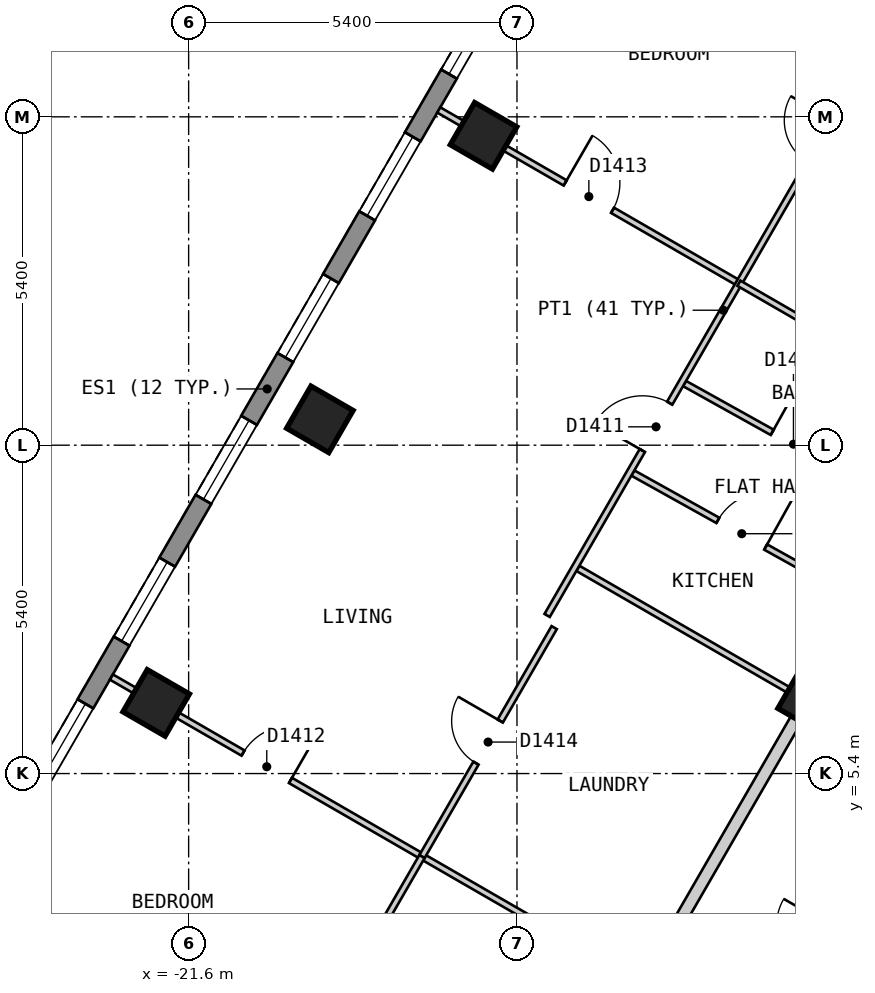
"""IFC4 building model, lengths in metres.
Left out: names, types, materials, properties, quantities, classifications, styles, units other than length and angle.
Written with IfcOpenShell. Run it as: python <this file> out.ifc"""

import sys

from ifc_helpers import new_model, si_unit, direction, frame, frame_2d, origin, origin_2d, place, context, subcontext, project, spatial, polyline, rectangle, outline, extrude, element, fill, save


model = new_model("IFC4")
c1 = context("Model", 3, precision=1e-05, world=origin(), true_north=direction((0.0, 1.0)))
c2 = subcontext(c1, "Body", "Model", "MODEL_VIEW")
j1 = project(units=[si_unit("LENGTHUNIT", "METRE"), si_unit("PLANEANGLEUNIT", "RADIAN")], contexts=[c1])
p1 = place(None, origin())
s1 = spatial("IfcSite", under=j1, at=p1, CompositionType="ELEMENT")
p2 = place(p1, origin())
s2 = spatial("IfcBuilding", under=s1, at=p2, CompositionType="ELEMENT")
p3 = place(p2, frame((0.0, 0.0, 166.2)))
s3 = spatial("IfcBuildingStorey", under=s2, at=p3, CompositionType="ELEMENT", Elevation=166.2)
for number, where, z_axis, x_axis in (
    (1, (-16.75, 15.888, 0.0), (0.0, 0.0, 1.0), (-0.5, -0.866, 0.0)),
    (2, (-19.442, 11.225, 0.0), (0.0, 0.0, 1.0), (-0.5, -0.866, 0.0)),
    (3, (-22.134, 6.562, 0.0), (0.0, 0.0, 1.0), (-0.5, -0.866, 0.0)),
):
    element("IfcColumn", number, at=place(p3, frame(where, z_axis=z_axis, x_axis=x_axis)), inside=s3, PredefinedType="COLUMN", context=c2, shape_type="SweptSolid", body=[
        extrude(rectangle(XDim=0.8, YDim=0.8, at=origin_2d()), origin(), (0.0, 0.0, 1.0), 3.0),
    ])
p4 = place(p3, frame((-11.431, 6.6, 0.0), z_axis=(0.0, 0.0, 1.0), x_axis=(-0.5, -0.866025403784, 0.0)))
e4 = element("IfcColumn", 4, at=p4, inside=s3, PredefinedType="COLUMN", context=c2, shape_type="SweptSolid", body=[
    extrude(rectangle(XDim=0.7, YDim=0.7, at=origin_2d()), origin(), (0.0, 0.0, 1.0), 3.0),
])
p5 = place(p3, frame((-14.592, 21.625, 0.0), z_axis=(0.0, 0.0, 1.0), x_axis=(-0.500010537973, -0.866019319597, 0.0)))
e5 = element("IfcWall", 5, at=p5, inside=s3, PredefinedType="SOLIDWALL", context=c2, shape_type="SweptSolid", body=[
    extrude(outline(polyline([(0.0, -0.15), (22.863, -0.15), (22.783, 0.15), (0.08, 0.15), (0.0, -0.15)])), origin(), (0.0, 0.0, 1.0), 2.7),
])
p6 = place(p5, frame((1.259, 0.0, 0.15)))
e6 = element("IfcOpeningElement", 6, at=p6, cuts=e5, PredefinedType="OPENING", context=c2, shape_type="SweptSolid", body=[
    extrude(rectangle(XDim=1.5, YDim=2.1, at=frame_2d((0.75, 1.05))), frame((0.0, 0.16, 0.0), z_axis=(0.0, -1.0, 0.0), x_axis=(1.0, 0.0, 0.0)), (0.0, 0.0, 1.0), 0.32),
])
p7 = place(p5, frame((3.952, 0.0, 0.15)))
e7 = element("IfcOpeningElement", 7, at=p7, cuts=e5, PredefinedType="OPENING", context=c2, shape_type="SweptSolid", body=[
    extrude(rectangle(XDim=1.5, YDim=2.1, at=frame_2d((0.75, 1.05))), frame((0.0, 0.16, 0.0), z_axis=(0.0, -1.0, 0.0), x_axis=(1.0, 0.0, 0.0)), (0.0, 0.0, 1.0), 0.32),
])
p8 = place(p5, frame((6.644, 0.0, 0.15)))
e8 = element("IfcOpeningElement", 8, at=p8, cuts=e5, PredefinedType="OPENING", context=c2, shape_type="SweptSolid", body=[
    extrude(rectangle(XDim=1.5, YDim=2.1, at=frame_2d((0.75, 1.05))), frame((0.0, 0.16, 0.0), z_axis=(0.0, -1.0, 0.0), x_axis=(1.0, 0.0, 0.0)), (0.0, 0.0, 1.0), 0.32),
])
p9 = place(p5, frame((9.335, 0.0, 0.15)))
e9 = element("IfcOpeningElement", 9, at=p9, cuts=e5, PredefinedType="OPENING", context=c2, shape_type="SweptSolid", body=[
    extrude(rectangle(XDim=1.5, YDim=2.1, at=frame_2d((0.75, 1.05))), frame((0.0, 0.16, 0.0), z_axis=(0.0, -1.0, 0.0), x_axis=(1.0, 0.0, 0.0)), (0.0, 0.0, 1.0), 0.32),
])
p10 = place(p5, frame((12.028, 0.0, 0.15)))
e10 = element("IfcOpeningElement", 10, at=p10, cuts=e5, PredefinedType="OPENING", context=c2, shape_type="SweptSolid", body=[
    extrude(rectangle(XDim=1.5, YDim=2.1, at=frame_2d((0.75, 1.05))), frame((0.0, 0.16, 0.0), z_axis=(0.0, -1.0, 0.0), x_axis=(1.0, 0.0, 0.0)), (0.0, 0.0, 1.0), 0.32),
])
p11 = place(p5, frame((14.72, 0.0, 0.15)))
e11 = element("IfcOpeningElement", 11, at=p11, cuts=e5, PredefinedType="OPENING", context=c2, shape_type="SweptSolid", body=[
    extrude(rectangle(XDim=1.5, YDim=2.1, at=frame_2d((0.75, 1.05))), frame((0.0, 0.16, 0.0), z_axis=(0.0, -1.0, 0.0), x_axis=(1.0, 0.0, 0.0)), (0.0, 0.0, 1.0), 0.32),
])
p12 = place(p5, frame((17.411, 0.0, 0.15)))
e12 = element("IfcOpeningElement", 12, at=p12, cuts=e5, PredefinedType="OPENING", context=c2, shape_type="SweptSolid", body=[
    extrude(rectangle(XDim=1.5, YDim=2.1, at=frame_2d((0.75, 1.05))), frame((0.0, 0.16, 0.0), z_axis=(0.0, -1.0, 0.0), x_axis=(1.0, 0.0, 0.0)), (0.0, 0.0, 1.0), 0.32),
])
p13 = place(p5, frame((20.104, 0.0, 0.15)))
e13 = element("IfcOpeningElement", 13, at=p13, cuts=e5, PredefinedType="OPENING", context=c2, shape_type="SweptSolid", body=[
    extrude(rectangle(XDim=1.5, YDim=2.1, at=frame_2d((0.75, 1.05))), frame((0.0, 0.16, 0.0), z_axis=(0.0, -1.0, 0.0), x_axis=(1.0, 0.0, 0.0)), (0.0, 0.0, 1.0), 0.32),
])
p14 = place(p3, frame((-13.048, -0.601, 0.0), z_axis=(0.0, 0.0, 1.0), x_axis=(0.499982180423, 0.866035691677, 0.0)))
e14 = element("IfcWall", 14, at=p14, inside=s3, PredefinedType="PARTITIONING", context=c2, shape_type="SweptSolid", body=[
    extrude(rectangle(XDim=7.16, YDim=0.2, at=frame_2d((3.58, 0.0))), origin(), (0.0, 0.0, 1.0), 2.7),
])
p15 = place(p14, frame((3.13, 0.0, 0.0)))
e15 = element("IfcOpeningElement", 15, at=p15, cuts=e14, PredefinedType="OPENING", context=c2, shape_type="SweptSolid", body=[
    extrude(rectangle(XDim=0.9, YDim=2.1, at=frame_2d((0.45, 1.05))), frame((0.0, 0.11, 0.0), z_axis=(0.0, -1.0, 0.0), x_axis=(1.0, 0.0, 0.0)), (0.0, 0.0, 1.0), 0.22),
])
p16 = place(p3, frame((-15.53, -0.501, 0.0), z_axis=(0.0, 0.0, 1.0), x_axis=(0.499952498232, 0.866052827206, 0.0)))
e16 = element("IfcWall", 16, at=p16, inside=s3, PredefinedType="PARTITIONING", context=c2, shape_type="SweptSolid", body=[
    extrude(rectangle(XDim=9.585, YDim=0.2, at=frame_2d((4.792, 0.0))), origin(), (0.0, 0.0, 1.0), 2.7),
])
p17 = place(p3, frame((-13.444, 11.814, 0.0), z_axis=(0.0, 0.0, 1.0), x_axis=(0.873653620945, -0.486548405207, 0.0)))
e17 = element("IfcWall", 17, at=p17, inside=s3, PredefinedType="PARTITIONING", context=c2, shape_type="SweptSolid", body=[
    extrude(rectangle(XDim=4.051, YDim=0.1, at=frame_2d((2.025, 0.0))), origin(), (0.0, 0.0, 1.0), 2.7),
])
p18 = place(p17, frame((1.65, 0.0, 0.0)))
e18 = element("IfcOpeningElement", 18, at=p18, cuts=e17, PredefinedType="OPENING", context=c2, shape_type="SweptSolid", body=[
    extrude(rectangle(XDim=0.8, YDim=2.1, at=frame_2d((0.4, 1.05))), frame((0.0, 0.06, 0.0), z_axis=(0.0, -1.0, 0.0), x_axis=(1.0, 0.0, 0.0)), (0.0, 0.0, 1.0), 0.12),
])
p19 = place(p3, frame((-14.294, 10.342, 0.0), z_axis=(0.0, 0.0, 1.0), x_axis=(0.873582256032, -0.486676527013, 0.0)))
e19 = element("IfcWall", 19, at=p19, inside=s3, PredefinedType="PARTITIONING", context=c2, shape_type="SweptSolid", body=[
    extrude(rectangle(XDim=4.05, YDim=0.1, at=frame_2d((2.025, 0.0))), origin(), (0.0, 0.0, 1.0), 2.7),
])
p20 = place(p19, frame((1.6, 0.0, 0.0)))
e20 = element("IfcOpeningElement", 20, at=p20, cuts=e19, PredefinedType="OPENING", context=c2, shape_type="SweptSolid", body=[
    extrude(rectangle(XDim=0.9, YDim=2.1, at=frame_2d((0.45, 1.05))), frame((0.0, 0.06, 0.0), z_axis=(0.0, -1.0, 0.0), x_axis=(1.0, 0.0, 0.0)), (0.0, 0.0, 1.0), 0.12),
])
p21 = place(p3, frame((-22.87, 6.987, 0.0), z_axis=(0.0, 0.0, 1.0), x_axis=(0.866022959057, -0.500004234368, 0.0)))
e21 = element("IfcWall", 21, at=p21, inside=s3, PredefinedType="PARTITIONING", context=c2, shape_type="SweptSolid", body=[
    extrude(rectangle(XDim=10.0, YDim=0.1, at=frame_2d((5.0, 0.0))), origin(), (0.0, 0.0, 1.0), 2.7),
])
p22 = place(p21, frame((2.5, 0.0, 0.0)))
e22 = element("IfcOpeningElement", 22, at=p22, cuts=e21, PredefinedType="OPENING", context=c2, shape_type="SweptSolid", body=[
    extrude(rectangle(XDim=0.9, YDim=2.1, at=frame_2d((0.45, 1.05))), frame((0.0, 0.06, 0.0), z_axis=(0.0, -1.0, 0.0), x_axis=(1.0, 0.0, 0.0)), (0.0, 0.0, 1.0), 0.12),
])
p23 = place(p3, frame((-15.199, 8.775, 0.0), z_axis=(0.0, 0.0, 1.0), x_axis=(0.866043063166, -0.499969411806, 0.0)))
e23 = element("IfcWall", 23, at=p23, inside=s3, PredefinedType="PARTITIONING", context=c2, shape_type="SweptSolid", body=[
    extrude(rectangle(XDim=4.25, YDim=0.1, at=frame_2d((2.125, 0.0))), origin(), (0.0, 0.0, 1.0), 2.7),
])
p24 = place(p3, frame((-17.486, 16.313, 0.0), z_axis=(0.0, 0.0, 1.0), x_axis=(0.866004402611, -0.500036373335, 0.0)))
e24 = element("IfcWall", 24, at=p24, inside=s3, PredefinedType="PARTITIONING", context=c2, shape_type="SweptSolid", body=[
    extrude(rectangle(XDim=5.7, YDim=0.1, at=frame_2d((2.85, 0.0))), origin(), (0.0, 0.0, 1.0), 2.7),
])
p25 = place(p24, frame((2.4, 0.0, 0.0)))
e25 = element("IfcOpeningElement", 25, at=p25, cuts=e24, PredefinedType="OPENING", context=c2, shape_type="SweptSolid", body=[
    extrude(rectangle(XDim=0.9, YDim=2.1, at=frame_2d((0.45, 1.05))), frame((0.0, 0.06, 0.0), z_axis=(0.0, -1.0, 0.0), x_axis=(1.0, 0.0, 0.0)), (0.0, 0.0, 1.0), 0.12),
])
p26 = place(p3, frame((-19.283, 1.4, 0.0), z_axis=(0.0, 0.0, 1.0), x_axis=(0.499847391584, 0.866113494368, 0.0)))
e26 = element("IfcWall", 26, at=p26, inside=s3, PredefinedType="PARTITIONING", context=c2, shape_type="SweptSolid", body=[
    extrude(rectangle(XDim=3.045, YDim=0.1, at=frame_2d((1.522, 0.0))), origin(), (0.0, 0.0, 1.0), 2.7),
])
p27 = place(p26, frame((1.123, 0.0, 0.0)))
e27 = element("IfcOpeningElement", 27, at=p27, cuts=e26, PredefinedType="OPENING", context=c2, shape_type="SweptSolid", body=[
    extrude(rectangle(XDim=0.8, YDim=2.1, at=frame_2d((0.4, 1.05))), frame((0.0, 0.06, 0.0), z_axis=(0.0, -1.0, 0.0), x_axis=(1.0, 0.0, 0.0)), (0.0, 0.0, 1.0), 0.12),
])
p28 = place(p3, frame((-15.704, 8.0, 0.0), z_axis=(0.0, 0.0, 1.0), x_axis=(0.500005637941, 0.866022148693, 0.0)))
e28 = element("IfcWall", 28, at=p28, inside=s3, PredefinedType="PARTITIONING", context=c2, shape_type="SweptSolid", body=[
    extrude(rectangle(XDim=11.592, YDim=0.1, at=frame_2d((5.796, 0.0))), origin(), (0.0, 0.0, 1.0), 2.7),
])
p29 = place(p28, frame((3.132, 0.0, 0.0)))
e29 = element("IfcOpeningElement", 29, at=p29, cuts=e28, PredefinedType="OPENING", context=c2, shape_type="SweptSolid", body=[
    extrude(rectangle(XDim=0.9, YDim=2.1, at=frame_2d((0.45, 1.05))), frame((0.0, 0.06, 0.0), z_axis=(0.0, -1.0, 0.0), x_axis=(1.0, 0.0, 0.0)), (0.0, 0.0, 1.0), 0.12),
])
p30 = place(p28, frame((8.6, 0.0, 0.0)))
e30 = element("IfcOpeningElement", 30, at=p30, cuts=e28, PredefinedType="OPENING", context=c2, shape_type="SweptSolid", body=[
    extrude(rectangle(XDim=0.8, YDim=2.1, at=frame_2d((0.4, 1.05))), frame((0.0, 0.06, 0.0), z_axis=(0.0, -1.0, 0.0), x_axis=(1.0, 0.0, 0.0)), (0.0, 0.0, 1.0), 0.12),
])
p31 = place(p3, frame((-17.761, 4.037, 0.0), z_axis=(0.0, 0.0, 1.0), x_axis=(0.50009692756, 0.865969435399, 0.0)))
e31 = element("IfcWall", 31, at=p31, inside=s3, PredefinedType="PARTITIONING", context=c2, shape_type="SweptSolid", body=[
    extrude(rectangle(XDim=4.345, YDim=0.1, at=frame_2d((2.173, 0.0))), origin(), (0.0, 0.0, 1.0), 2.7),
])
p32 = place(p31, frame((1.772, 0.0, 0.0)))
e32 = element("IfcOpeningElement", 32, at=p32, cuts=e31, PredefinedType="OPENING", context=c2, shape_type="SweptSolid", body=[
    extrude(rectangle(XDim=0.8, YDim=2.1, at=frame_2d((0.4, 1.05))), frame((0.0, 0.06, 0.0), z_axis=(0.0, -1.0, 0.0), x_axis=(1.0, 0.0, 0.0)), (0.0, 0.0, 1.0), 0.12),
])
p33 = place(p3, frame((-12.55, 13.463, 0.0), z_axis=(0.0, 0.0, 1.0), x_axis=(0.86606561423, -0.499930346997, 0.0)))
e33 = element("IfcWall", 33, at=p33, inside=s3, PredefinedType="PARTITIONING", context=c2, shape_type="SweptSolid", body=[
    extrude(rectangle(XDim=4.1, YDim=0.1, at=frame_2d((2.05, 0.0))), origin(), (0.0, 0.0, 1.0), 2.7),
])
p34 = place(p7, origin())
e34 = element("IfcWindow", 34, at=p34, inside=s3, PartitioningType="SINGLE_PANEL", PredefinedType="WINDOW", context=c2, shape_type="SweptSolid", body=[
    extrude(rectangle(XDim=1.5, YDim=2.1, at=frame_2d((0.75, 1.05))), frame((0.0, 0.03, 0.0), z_axis=(0.0, -1.0, 0.0), x_axis=(1.0, 0.0, 0.0)), (0.0, 0.0, 1.0), 0.06),
])
fill(e7, e34)
p35 = place(p8, origin())
e35 = element("IfcWindow", 35, at=p35, inside=s3, PartitioningType="SINGLE_PANEL", PredefinedType="WINDOW", context=c2, shape_type="SweptSolid", body=[
    extrude(rectangle(XDim=1.5, YDim=2.1, at=frame_2d((0.75, 1.05))), frame((0.0, 0.03, 0.0), z_axis=(0.0, -1.0, 0.0), x_axis=(1.0, 0.0, 0.0)), (0.0, 0.0, 1.0), 0.06),
])
fill(e8, e35)
p36 = place(p9, origin())
e36 = element("IfcWindow", 36, at=p36, inside=s3, PartitioningType="SINGLE_PANEL", PredefinedType="WINDOW", context=c2, shape_type="SweptSolid", body=[
    extrude(rectangle(XDim=1.5, YDim=2.1, at=frame_2d((0.75, 1.05))), frame((0.0, 0.03, 0.0), z_axis=(0.0, -1.0, 0.0), x_axis=(1.0, 0.0, 0.0)), (0.0, 0.0, 1.0), 0.06),
])
fill(e9, e36)
p37 = place(p10, origin())
e37 = element("IfcWindow", 37, at=p37, inside=s3, PartitioningType="SINGLE_PANEL", PredefinedType="WINDOW", context=c2, shape_type="SweptSolid", body=[
    extrude(rectangle(XDim=1.5, YDim=2.1, at=frame_2d((0.75, 1.05))), frame((0.0, 0.03, 0.0), z_axis=(0.0, -1.0, 0.0), x_axis=(1.0, 0.0, 0.0)), (0.0, 0.0, 1.0), 0.06),
])
fill(e10, e37)
p38 = place(p11, origin())
e38 = element("IfcWindow", 38, at=p38, inside=s3, PartitioningType="SINGLE_PANEL", PredefinedType="WINDOW", context=c2, shape_type="SweptSolid", body=[
    extrude(rectangle(XDim=1.5, YDim=2.1, at=frame_2d((0.75, 1.05))), frame((0.0, 0.03, 0.0), z_axis=(0.0, -1.0, 0.0), x_axis=(1.0, 0.0, 0.0)), (0.0, 0.0, 1.0), 0.06),
])
fill(e11, e38)
p39 = place(p12, origin())
e39 = element("IfcWindow", 39, at=p39, inside=s3, PartitioningType="SINGLE_PANEL", PredefinedType="WINDOW", context=c2, shape_type="SweptSolid", body=[
    extrude(rectangle(XDim=1.5, YDim=2.1, at=frame_2d((0.75, 1.05))), frame((0.0, 0.03, 0.0), z_axis=(0.0, -1.0, 0.0), x_axis=(1.0, 0.0, 0.0)), (0.0, 0.0, 1.0), 0.06),
])
fill(e12, e39)
p40 = place(p18, origin())
e40 = element("IfcDoor", 40, at=p40, inside=s3, OperationType="SINGLE_SWING_LEFT", PredefinedType="DOOR", context=c2, shape_type="SweptSolid", body=[
    extrude(rectangle(XDim=0.8, YDim=2.1, at=frame_2d((0.4, 1.05))), frame((0.0, 0.025, 0.0), z_axis=(0.0, -1.0, 0.0), x_axis=(1.0, 0.0, 0.0)), (0.0, 0.0, 1.0), 0.05),
])
fill(e18, e40)
p41 = place(p20, origin())
e41 = element("IfcDoor", 41, at=p41, inside=s3, OperationType="SINGLE_SWING_RIGHT", PredefinedType="DOOR", context=c2, shape_type="SweptSolid", body=[
    extrude(rectangle(XDim=0.9, YDim=2.1, at=frame_2d((0.45, 1.05))), frame((0.0, 0.025, 0.0), z_axis=(0.0, -1.0, 0.0), x_axis=(1.0, 0.0, 0.0)), (0.0, 0.0, 1.0), 0.05),
])
fill(e20, e41)
p42 = place(p29, origin())
e42 = element("IfcDoor", 42, at=p42, inside=s3, OperationType="SINGLE_SWING_LEFT", PredefinedType="DOOR", context=c2, shape_type="SweptSolid", body=[
    extrude(rectangle(XDim=0.9, YDim=2.1, at=frame_2d((0.45, 1.05))), frame((0.0, 0.025, 0.0), z_axis=(0.0, -1.0, 0.0), x_axis=(1.0, 0.0, 0.0)), (0.0, 0.0, 1.0), 0.05),
])
fill(e29, e42)
p43 = place(p22, origin())
e43 = element("IfcDoor", 43, at=p43, inside=s3, OperationType="SINGLE_SWING_RIGHT", PredefinedType="DOOR", context=c2, shape_type="SweptSolid", body=[
    extrude(rectangle(XDim=0.9, YDim=2.1, at=frame_2d((0.45, 1.05))), frame((0.0, 0.025, 0.0), z_axis=(0.0, -1.0, 0.0), x_axis=(1.0, 0.0, 0.0)), (0.0, 0.0, 1.0), 0.05),
])
fill(e22, e43)
p44 = place(p25, origin())
e44 = element("IfcDoor", 44, at=p44, inside=s3, OperationType="SINGLE_SWING_LEFT", PredefinedType="DOOR", context=c2, shape_type="SweptSolid", body=[
    extrude(rectangle(XDim=0.9, YDim=2.1, at=frame_2d((0.45, 1.05))), frame((0.0, 0.025, 0.0), z_axis=(0.0, -1.0, 0.0), x_axis=(1.0, 0.0, 0.0)), (0.0, 0.0, 1.0), 0.05),
])
fill(e25, e44)
p45 = place(p32, origin())
e45 = element("IfcDoor", 45, at=p45, inside=s3, OperationType="SINGLE_SWING_RIGHT", PredefinedType="DOOR", context=c2, shape_type="SweptSolid", body=[
    extrude(rectangle(XDim=0.8, YDim=2.1, at=frame_2d((0.4, 1.05))), frame((0.0, 0.025, 0.0), z_axis=(0.0, -1.0, 0.0), x_axis=(1.0, 0.0, 0.0)), (0.0, 0.0, 1.0), 0.05),
])
fill(e32, e45)
save(model, sys.argv[1])
